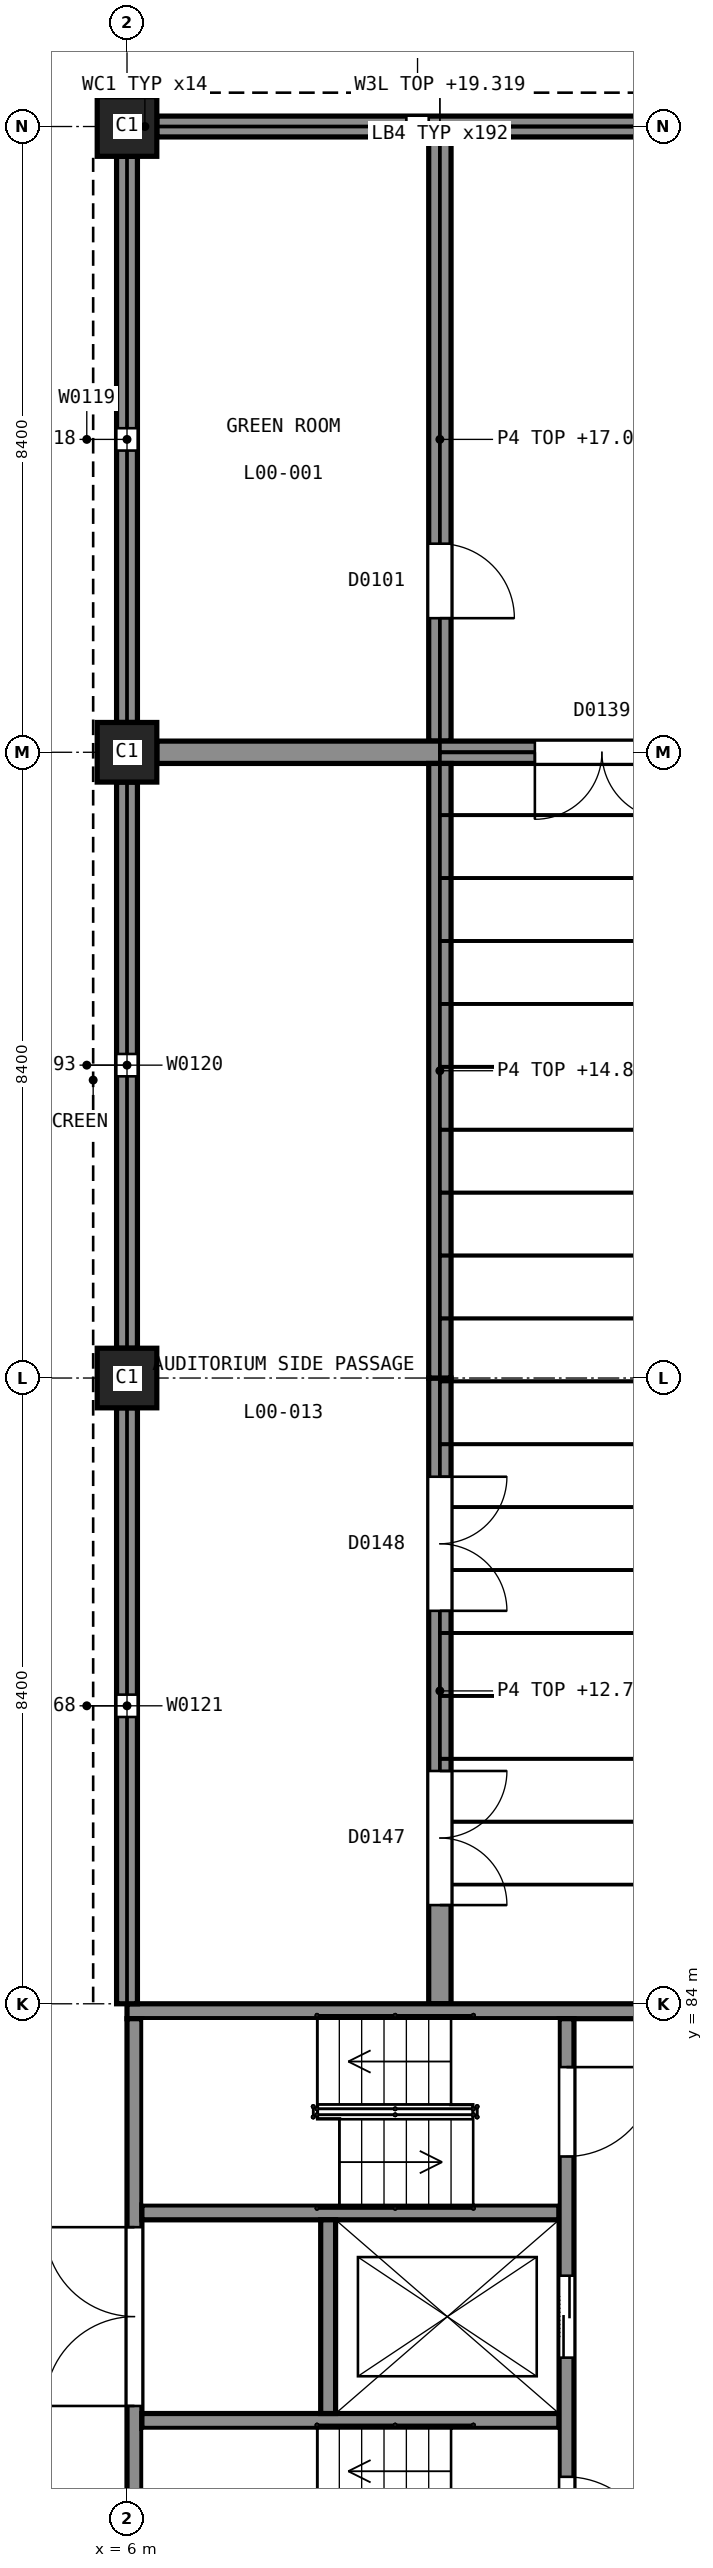
"""IFC4 building model, lengths in metres.
Left out: names, types, materials, properties, quantities, classifications, styles, units other than length and angle.
Written with IfcOpenShell. Run it as: python <this file> out.ifc"""

import sys

from ifc_helpers import new_model, si_unit, direction, frame, frame_2d, origin, origin_2d, place, context, subcontext, project, spatial, polyline, rectangle, outline, extrude, element, fill, save


model = new_model("IFC4")
c1 = context("Model", 3, precision=1e-05, world=origin(), true_north=direction((0.0, 1.0)))
c2 = subcontext(c1, "Body", "Model", "MODEL_VIEW")
j1 = project(units=[si_unit("LENGTHUNIT", "METRE"), si_unit("PLANEANGLEUNIT", "RADIAN")], contexts=[c1])
p1 = place(None, origin())
s1 = spatial("IfcSite", under=j1, at=p1, CompositionType="ELEMENT")
p2 = place(p1, origin())
s2 = spatial("IfcBuilding", under=s1, at=p2, CompositionType="ELEMENT")
p3 = place(p2, origin())
s3 = spatial("IfcBuildingStorey", under=s2, at=p3, CompositionType="ELEMENT", Elevation=0.0)
p4 = place(p3, frame((6.0, 83.9, -1.8), z_axis=(0.0, 0.0, 1.0), x_axis=(1.0, 0.0, 0.0)))
e1 = element("IfcWall", 1, at=p4, inside=s3, PredefinedType="SHEAR", context=c2, shape_type="SweptSolid", body=[
    extrude(rectangle(XDim=8.4, YDim=0.2, at=frame_2d((4.2, 0.0))), origin(), (0.0, 0.0, 1.0), 7.3),
])
p5 = place(p3, frame((6.1, 75.8, -1.8), z_axis=(0.0, 0.0, 1.0), x_axis=(0.0, 1.0, 0.0)))
e2 = element("IfcWall", 2, at=p5, inside=s3, PredefinedType="SHEAR", context=c2, shape_type="SweptSolid", body=[
    extrude(rectangle(XDim=8.0, YDim=0.2, at=frame_2d((4.0, 0.0))), origin(), (0.0, 0.0, 1.0), 7.3),
])
p6 = place(p5, frame((2.801, 0.0, 1.8)))
e3 = element("IfcOpeningElement", 3, at=p6, cuts=e2, PredefinedType="OPENING", context=c2, shape_type="SweptSolid", body=[
    extrude(rectangle(XDim=2.4, YDim=2.1, at=frame_2d((1.2, 1.05))), frame((0.0, 0.11, 0.0), z_axis=(0.0, -1.0, 0.0), x_axis=(1.0, 0.0, 0.0)), (0.0, 0.0, 1.0), 0.22),
])
p7 = place(p3, frame((11.9, 75.8, -1.8), z_axis=(0.0, 0.0, 1.0), x_axis=(0.0, 1.0, 0.0)))
e4 = element("IfcWall", 4, at=p7, inside=s3, PredefinedType="SHEAR", context=c2, shape_type="SweptSolid", body=[
    extrude(rectangle(XDim=8.0, YDim=0.2, at=frame_2d((4.0, 0.0))), origin(), (0.0, 0.0, 1.0), 7.3),
])
p8 = place(p7, frame((0.65, 0.0, 1.8)))
e5 = element("IfcOpeningElement", 5, at=p8, cuts=e4, PredefinedType="OPENING", context=c2, shape_type="SweptSolid", body=[
    extrude(rectangle(XDim=1.2, YDim=2.1, at=frame_2d((0.6, 1.05))), frame((0.0, 0.11, 0.0), z_axis=(0.0, -1.0, 0.0), x_axis=(1.0, 0.0, 0.0)), (0.0, 0.0, 1.0), 0.22),
])
p9 = place(p7, frame((6.15, 0.0, 1.8)))
e6 = element("IfcOpeningElement", 6, at=p9, cuts=e4, PredefinedType="OPENING", context=c2, shape_type="SweptSolid", body=[
    extrude(rectangle(XDim=1.2, YDim=2.1, at=frame_2d((0.6, 1.05))), frame((0.0, 0.11, 0.0), z_axis=(0.0, -1.0, 0.0), x_axis=(1.0, 0.0, 0.0)), (0.0, 0.0, 1.0), 0.22),
])
p10 = place(p7, frame((3.45, 0.0, 1.8)))
e7 = element("IfcOpeningElement", 7, at=p10, cuts=e4, PredefinedType="OPENING", context=c2, shape_type="SweptSolid", body=[
    extrude(rectangle(XDim=1.1, YDim=2.1, at=frame_2d((0.55, 1.05))), frame((0.0, 0.11, 0.0), z_axis=(0.0, -1.0, 0.0), x_axis=(1.0, 0.0, 0.0)), (0.0, 0.0, 1.0), 0.22),
])
for number, where, z_axis, x_axis in (
    (8, (6.2, 78.4, -1.8), (0.0, 0.0, 1.0), (1.0, 0.0, 0.0)),
    (9, (6.2, 81.2, -1.8), (0.0, 0.0, 1.0), (1.0, 0.0, 0.0)),
):
    element("IfcWall", number, at=place(p3, frame(where, z_axis=z_axis, x_axis=x_axis)), inside=s3, PredefinedType="SHEAR", context=c2, shape_type="SweptSolid", body=[
        extrude(rectangle(XDim=5.6, YDim=0.2, at=frame_2d((2.8, 0.0))), origin(), (0.0, 0.0, 1.0), 7.3),
    ])
p11 = place(p3, frame((8.7, 78.5, -1.8), z_axis=(0.0, 0.0, 1.0), x_axis=(0.0, 1.0, 0.0)))
e10 = element("IfcWall", 10, at=p11, inside=s3, PredefinedType="SHEAR", context=c2, shape_type="SweptSolid", body=[
    extrude(rectangle(XDim=2.6, YDim=0.2, at=frame_2d((1.3, 0.0))), origin(), (0.0, 0.0, 1.0), 7.3),
])
for number, where, z_axis, x_axis in (
    (11, (6.0, 92.4, -0.3), (0.0, 0.0, 1.0), (1.0, 0.0, 0.0)),
    (12, (6.0, 100.8, -0.3), (0.0, 0.0, 1.0), (1.0, 0.0, 0.0)),
    (13, (6.0, 109.2, -0.3), (0.0, 0.0, 1.0), (1.0, 0.0, 0.0)),
):
    element("IfcColumn", number, at=place(p3, frame(where, z_axis=z_axis, x_axis=x_axis)), inside=s3, PredefinedType="COLUMN", context=c2, shape_type="SweptSolid", body=[
        extrude(rectangle(XDim=0.8, YDim=0.8, at=origin_2d()), origin(), (0.0, 0.0, 1.0), 5.8),
    ])
p12 = place(p3, frame((6.4, 109.2, 0.0), z_axis=(0.0, 0.0, 1.0), x_axis=(1.0, 0.0, 0.0)))
e14 = element("IfcWall", 14, at=p12, inside=s3, PredefinedType="SOLIDWALL", context=c2, shape_type="SweptSolid", body=[
    extrude(rectangle(XDim=7.6, YDim=0.28, at=frame_2d((3.8, 0.0))), origin(), (0.0, 0.0, 1.0), 19.319),
])
p13 = place(p12, frame((3.35, 0.0, 1.2)))
e15 = element("IfcOpeningElement", 15, at=p13, cuts=e14, PredefinedType="OPENING", context=c2, shape_type="SweptSolid", body=[
    extrude(rectangle(XDim=0.3, YDim=3.0, at=frame_2d((0.15, 1.5))), frame((0.0, 0.15, 0.0), z_axis=(0.0, -1.0, 0.0), x_axis=(1.0, 0.0, 0.0)), (0.0, 0.0, 1.0), 0.3),
])
p14 = place(p3, frame((6.0, 101.2, 0.0), z_axis=(0.0, 0.0, 1.0), x_axis=(0.0, 1.0, 0.0)))
e16 = element("IfcWall", 16, at=p14, inside=s3, PredefinedType="SOLIDWALL", context=c2, shape_type="SweptSolid", body=[
    extrude(outline(polyline([(0.0, 0.0), (7.6, 0.0), (7.6, 19.218), (0.0, 17.295), (0.0, 0.0)])), frame((0.0, 0.14, 0.0), z_axis=(0.0, -1.0, 0.0), x_axis=(1.0, 0.0, 0.0)), (0.0, 0.0, 1.0), 0.28),
])
p15 = place(p14, frame((3.65, 0.0, 1.2)))
e17 = element("IfcOpeningElement", 17, at=p15, cuts=e16, PredefinedType="OPENING", context=c2, shape_type="SweptSolid", body=[
    extrude(rectangle(XDim=0.3, YDim=3.0, at=frame_2d((0.15, 1.5))), frame((0.0, 0.15, 0.0), z_axis=(0.0, -1.0, 0.0), x_axis=(1.0, 0.0, 0.0)), (0.0, 0.0, 1.0), 0.3),
])
p16 = place(p3, frame((6.0, 92.8, 0.0), z_axis=(0.0, 0.0, 1.0), x_axis=(0.0, 1.0, 0.0)))
e18 = element("IfcWall", 18, at=p16, inside=s3, PredefinedType="SOLIDWALL", context=c2, shape_type="SweptSolid", body=[
    extrude(outline(polyline([(0.0, 0.0), (7.6, 0.0), (7.6, 17.093), (0.0, 15.17), (0.0, 0.0)])), frame((0.0, 0.14, 0.0), z_axis=(0.0, -1.0, 0.0), x_axis=(1.0, 0.0, 0.0)), (0.0, 0.0, 1.0), 0.28),
])
p17 = place(p16, frame((3.65, 0.0, 1.2)))
e19 = element("IfcOpeningElement", 19, at=p17, cuts=e18, PredefinedType="OPENING", context=c2, shape_type="SweptSolid", body=[
    extrude(rectangle(XDim=0.3, YDim=3.0, at=frame_2d((0.15, 1.5))), frame((0.0, 0.15, 0.0), z_axis=(0.0, -1.0, 0.0), x_axis=(1.0, 0.0, 0.0)), (0.0, 0.0, 1.0), 0.3),
])
p18 = place(p3, frame((6.0, 84.0, 0.0), z_axis=(0.0, 0.0, 1.0), x_axis=(0.0, 1.0, 0.0)))
e20 = element("IfcWall", 20, at=p18, inside=s3, PredefinedType="SOLIDWALL", context=c2, shape_type="SweptSolid", body=[
    extrude(outline(polyline([(0.0, 0.0), (8.0, 0.0), (8.0, 14.968), (0.0, 12.944), (0.0, 0.0)])), frame((0.0, 0.14, 0.0), z_axis=(0.0, -1.0, 0.0), x_axis=(1.0, 0.0, 0.0)), (0.0, 0.0, 1.0), 0.28),
])
p19 = place(p18, frame((3.85, 0.0, 1.2)))
e21 = element("IfcOpeningElement", 21, at=p19, cuts=e20, PredefinedType="OPENING", context=c2, shape_type="SweptSolid", body=[
    extrude(rectangle(XDim=0.3, YDim=3.0, at=frame_2d((0.15, 1.5))), frame((0.0, 0.15, 0.0), z_axis=(0.0, -1.0, 0.0), x_axis=(1.0, 0.0, 0.0)), (0.0, 0.0, 1.0), 0.3),
])
p20 = place(p3, frame((10.2, 100.95, 0.0), z_axis=(0.0, 0.0, 1.0), x_axis=(0.0, 1.0, 0.0)))
e22 = element("IfcWall", 22, at=p20, inside=s3, PredefinedType="PARTITIONING", context=c2, shape_type="SweptSolid", body=[
    extrude(outline(polyline([(0.0, 0.0), (8.1, 0.0), (8.1, 19.024), (7.35, 18.872), (6.3, 18.607), (4.2, 18.075), (3.15, 17.81), (2.1, 17.544), (1.05, 17.279), (0.0, 17.051), (0.0, 0.0)])), frame((0.0, 0.15, 0.0), z_axis=(0.0, -1.0, 0.0), x_axis=(1.0, 0.0, 0.0)), (0.0, 0.0, 1.0), 0.3),
])
p21 = place(p20, frame((1.65, 0.0, 0.0)))
e23 = element("IfcOpeningElement", 23, at=p21, cuts=e22, PredefinedType="OPENING", context=c2, shape_type="SweptSolid", body=[
    extrude(rectangle(XDim=1.0, YDim=2.1, at=frame_2d((0.5, 1.05))), frame((0.0, 0.16, 0.0), z_axis=(0.0, -1.0, 0.0), x_axis=(1.0, 0.0, 0.0)), (0.0, 0.0, 1.0), 0.32),
])
p22 = place(p3, frame((6.4, 100.8, 0.0), z_axis=(0.0, 0.0, 1.0), x_axis=(1.0, 0.0, 0.0)))
e24 = element("IfcWall", 24, at=p22, inside=s3, PredefinedType="PARTITIONING", context=c2, shape_type="SweptSolid", body=[
    extrude(rectangle(XDim=8.0, YDim=0.3, at=frame_2d((4.0, 0.0))), origin(), (0.0, 0.0, 1.0), 16.975),
])
p23 = place(p22, frame((5.075, 0.0, 0.0)))
e25 = element("IfcOpeningElement", 25, at=p23, cuts=e24, PredefinedType="OPENING", context=c2, shape_type="SweptSolid", body=[
    extrude(rectangle(XDim=1.8, YDim=2.1, at=frame_2d((0.9, 1.05))), frame((0.0, 0.16, 0.0), z_axis=(0.0, -1.0, 0.0), x_axis=(1.0, 0.0, 0.0)), (0.0, 0.0, 1.0), 0.32),
])
p24 = place(p3, frame((10.2, 84.0, 0.0), z_axis=(0.0, 0.0, 1.0), x_axis=(0.0, 1.0, 0.0)))
e26 = element("IfcWall", 26, at=p24, inside=s3, PredefinedType="PARTITIONING", context=c2, shape_type="SweptSolid", body=[
    extrude(outline(polyline([(0.0, 0.0), (8.4, 0.0), (8.4, 14.812), (7.35, 14.584), (6.3, 14.319), (5.25, 14.053), (4.2, 13.788), (2.1, 13.256), (1.05, 12.991), (0.0, 12.763), (0.0, 0.0)])), frame((0.0, 0.15, 0.0), z_axis=(0.0, -1.0, 0.0), x_axis=(1.0, 0.0, 0.0)), (0.0, 0.0, 1.0), 0.3),
])
p25 = place(p24, frame((1.325, 0.0, 0.0)))
e27 = element("IfcOpeningElement", 27, at=p25, cuts=e26, PredefinedType="OPENING", context=c2, shape_type="SweptSolid", body=[
    extrude(rectangle(XDim=1.8, YDim=2.1, at=frame_2d((0.9, 1.05))), frame((0.0, 0.16, 0.0), z_axis=(0.0, -1.0, 0.0), x_axis=(1.0, 0.0, 0.0)), (0.0, 0.0, 1.0), 0.32),
])
p26 = place(p24, frame((5.275, 0.0, 0.0)))
e28 = element("IfcOpeningElement", 28, at=p26, cuts=e26, PredefinedType="OPENING", context=c2, shape_type="SweptSolid", body=[
    extrude(rectangle(XDim=1.8, YDim=2.1, at=frame_2d((0.9, 1.05))), frame((0.0, 0.16, 0.0), z_axis=(0.0, -1.0, 0.0), x_axis=(1.0, 0.0, 0.0)), (0.0, 0.0, 1.0), 0.32),
])
p27 = place(p3, frame((10.2, 92.4, 0.0), z_axis=(0.0, 0.0, 1.0), x_axis=(0.0, 1.0, 0.0)))
e29 = element("IfcWall", 29, at=p27, inside=s3, PredefinedType="PARTITIONING", context=c2, shape_type="SweptSolid", body=[
    extrude(outline(polyline([(0.0, 0.0), (8.25, 0.0), (8.25, 16.899), (7.35, 16.709), (6.3, 16.444), (5.25, 16.178), (4.2, 15.913), (2.1, 15.381), (1.05, 15.116), (0.0, 14.888), (0.0, 0.0)])), frame((0.0, 0.15, 0.0), z_axis=(0.0, -1.0, 0.0), x_axis=(1.0, 0.0, 0.0)), (0.0, 0.0, 1.0), 0.3),
])
p28 = place(p13, origin())
e30 = element("IfcWindow", 30, at=p28, inside=s3, PartitioningType="SINGLE_PANEL", PredefinedType="WINDOW", context=c2, shape_type="SweptSolid", body=[
    extrude(rectangle(XDim=0.3, YDim=3.0, at=frame_2d((0.15, 1.5))), frame((0.0, -0.06, 0.0), z_axis=(0.0, -1.0, 0.0), x_axis=(1.0, 0.0, 0.0)), (0.0, 0.0, 1.0), 0.06),
])
fill(e15, e30)
p29 = place(p15, origin())
e31 = element("IfcWindow", 31, at=p29, inside=s3, PartitioningType="SINGLE_PANEL", PredefinedType="WINDOW", context=c2, shape_type="SweptSolid", body=[
    extrude(rectangle(XDim=0.3, YDim=3.0, at=frame_2d((0.15, 1.5))), frame((0.0, -0.06, 0.0), z_axis=(0.0, -1.0, 0.0), x_axis=(1.0, 0.0, 0.0)), (0.0, 0.0, 1.0), 0.06),
])
fill(e17, e31)
p30 = place(p17, origin())
e32 = element("IfcWindow", 32, at=p30, inside=s3, PartitioningType="SINGLE_PANEL", PredefinedType="WINDOW", context=c2, shape_type="SweptSolid", body=[
    extrude(rectangle(XDim=0.3, YDim=3.0, at=frame_2d((0.15, 1.5))), frame((0.0, -0.06, 0.0), z_axis=(0.0, -1.0, 0.0), x_axis=(1.0, 0.0, 0.0)), (0.0, 0.0, 1.0), 0.06),
])
fill(e19, e32)
p31 = place(p19, origin())
e33 = element("IfcWindow", 33, at=p31, inside=s3, PartitioningType="SINGLE_PANEL", PredefinedType="WINDOW", context=c2, shape_type="SweptSolid", body=[
    extrude(rectangle(XDim=0.3, YDim=3.0, at=frame_2d((0.15, 1.5))), frame((0.0, -0.06, 0.0), z_axis=(0.0, -1.0, 0.0), x_axis=(1.0, 0.0, 0.0)), (0.0, 0.0, 1.0), 0.06),
])
fill(e21, e33)
p32 = place(p6, origin())
e34 = element("IfcDoor", 34, at=p32, inside=s3, OperationType="DOUBLE_DOOR_SINGLE_SWING", PredefinedType="DOOR", context=c2, shape_type="SweptSolid", body=[
    extrude(rectangle(XDim=2.4, YDim=2.1, at=frame_2d((1.2, 1.05))), frame((0.0, 0.025, 0.0), z_axis=(0.0, -1.0, 0.0), x_axis=(1.0, 0.0, 0.0)), (0.0, 0.0, 1.0), 0.05),
])
fill(e3, e34)
p33 = place(p21, origin())
e35 = element("IfcDoor", 35, at=p33, inside=s3, OperationType="SINGLE_SWING_LEFT", PredefinedType="DOOR", context=c2, shape_type="SweptSolid", body=[
    extrude(rectangle(XDim=1.0, YDim=2.1, at=frame_2d((0.5, 1.05))), frame((0.0, 0.025, 0.0), z_axis=(0.0, -1.0, 0.0), x_axis=(1.0, 0.0, 0.0)), (0.0, 0.0, 1.0), 0.05),
])
fill(e23, e35)
p34 = place(p23, origin())
e36 = element("IfcDoor", 36, at=p34, inside=s3, OperationType="DOUBLE_DOOR_SINGLE_SWING", PredefinedType="DOOR", context=c2, shape_type="SweptSolid", body=[
    extrude(rectangle(XDim=1.8, YDim=2.1, at=frame_2d((0.9, 1.05))), frame((0.0, 0.025, 0.0), z_axis=(0.0, -1.0, 0.0), x_axis=(1.0, 0.0, 0.0)), (0.0, 0.0, 1.0), 0.05),
])
fill(e25, e36)
p35 = place(p25, origin())
e37 = element("IfcDoor", 37, at=p35, inside=s3, OperationType="DOUBLE_DOOR_SINGLE_SWING", PredefinedType="DOOR", context=c2, shape_type="SweptSolid", body=[
    extrude(rectangle(XDim=1.8, YDim=2.1, at=frame_2d((0.9, 1.05))), frame((0.0, 0.025, 0.0), z_axis=(0.0, -1.0, 0.0), x_axis=(1.0, 0.0, 0.0)), (0.0, 0.0, 1.0), 0.05),
])
fill(e27, e37)
p36 = place(p26, origin())
e38 = element("IfcDoor", 38, at=p36, inside=s3, OperationType="DOUBLE_DOOR_SINGLE_SWING", PredefinedType="DOOR", context=c2, shape_type="SweptSolid", body=[
    extrude(rectangle(XDim=1.8, YDim=2.1, at=frame_2d((0.9, 1.05))), frame((0.0, 0.025, 0.0), z_axis=(0.0, -1.0, 0.0), x_axis=(1.0, 0.0, 0.0)), (0.0, 0.0, 1.0), 0.05),
])
fill(e28, e38)
p37 = place(p8, origin())
e39 = element("IfcDoor", 39, at=p37, inside=s3, OperationType="SINGLE_SWING_LEFT", PredefinedType="DOOR", context=c2, shape_type="SweptSolid", body=[
    extrude(rectangle(XDim=1.2, YDim=2.1, at=frame_2d((0.6, 1.05))), frame((0.0, 0.025, 0.0), z_axis=(0.0, -1.0, 0.0), x_axis=(1.0, 0.0, 0.0)), (0.0, 0.0, 1.0), 0.05),
])
fill(e5, e39)
p38 = place(p9, origin())
e40 = element("IfcDoor", 40, at=p38, inside=s3, OperationType="SINGLE_SWING_RIGHT", PredefinedType="DOOR", context=c2, shape_type="SweptSolid", body=[
    extrude(rectangle(XDim=1.2, YDim=2.1, at=frame_2d((0.6, 1.05))), frame((0.0, 0.025, 0.0), z_axis=(0.0, -1.0, 0.0), x_axis=(1.0, 0.0, 0.0)), (0.0, 0.0, 1.0), 0.05),
])
fill(e6, e40)
p39 = place(p10, origin())
e41 = element("IfcDoor", 41, at=p39, inside=s3, OperationType="DOUBLE_DOOR_SLIDING", PredefinedType="DOOR", context=c2, shape_type="SweptSolid", body=[
    extrude(rectangle(XDim=1.1, YDim=2.1, at=frame_2d((0.55, 1.05))), frame((0.0, 0.025, 0.0), z_axis=(0.0, -1.0, 0.0), x_axis=(1.0, 0.0, 0.0)), (0.0, 0.0, 1.0), 0.05),
])
fill(e7, e41)
save(model, sys.argv[1])
